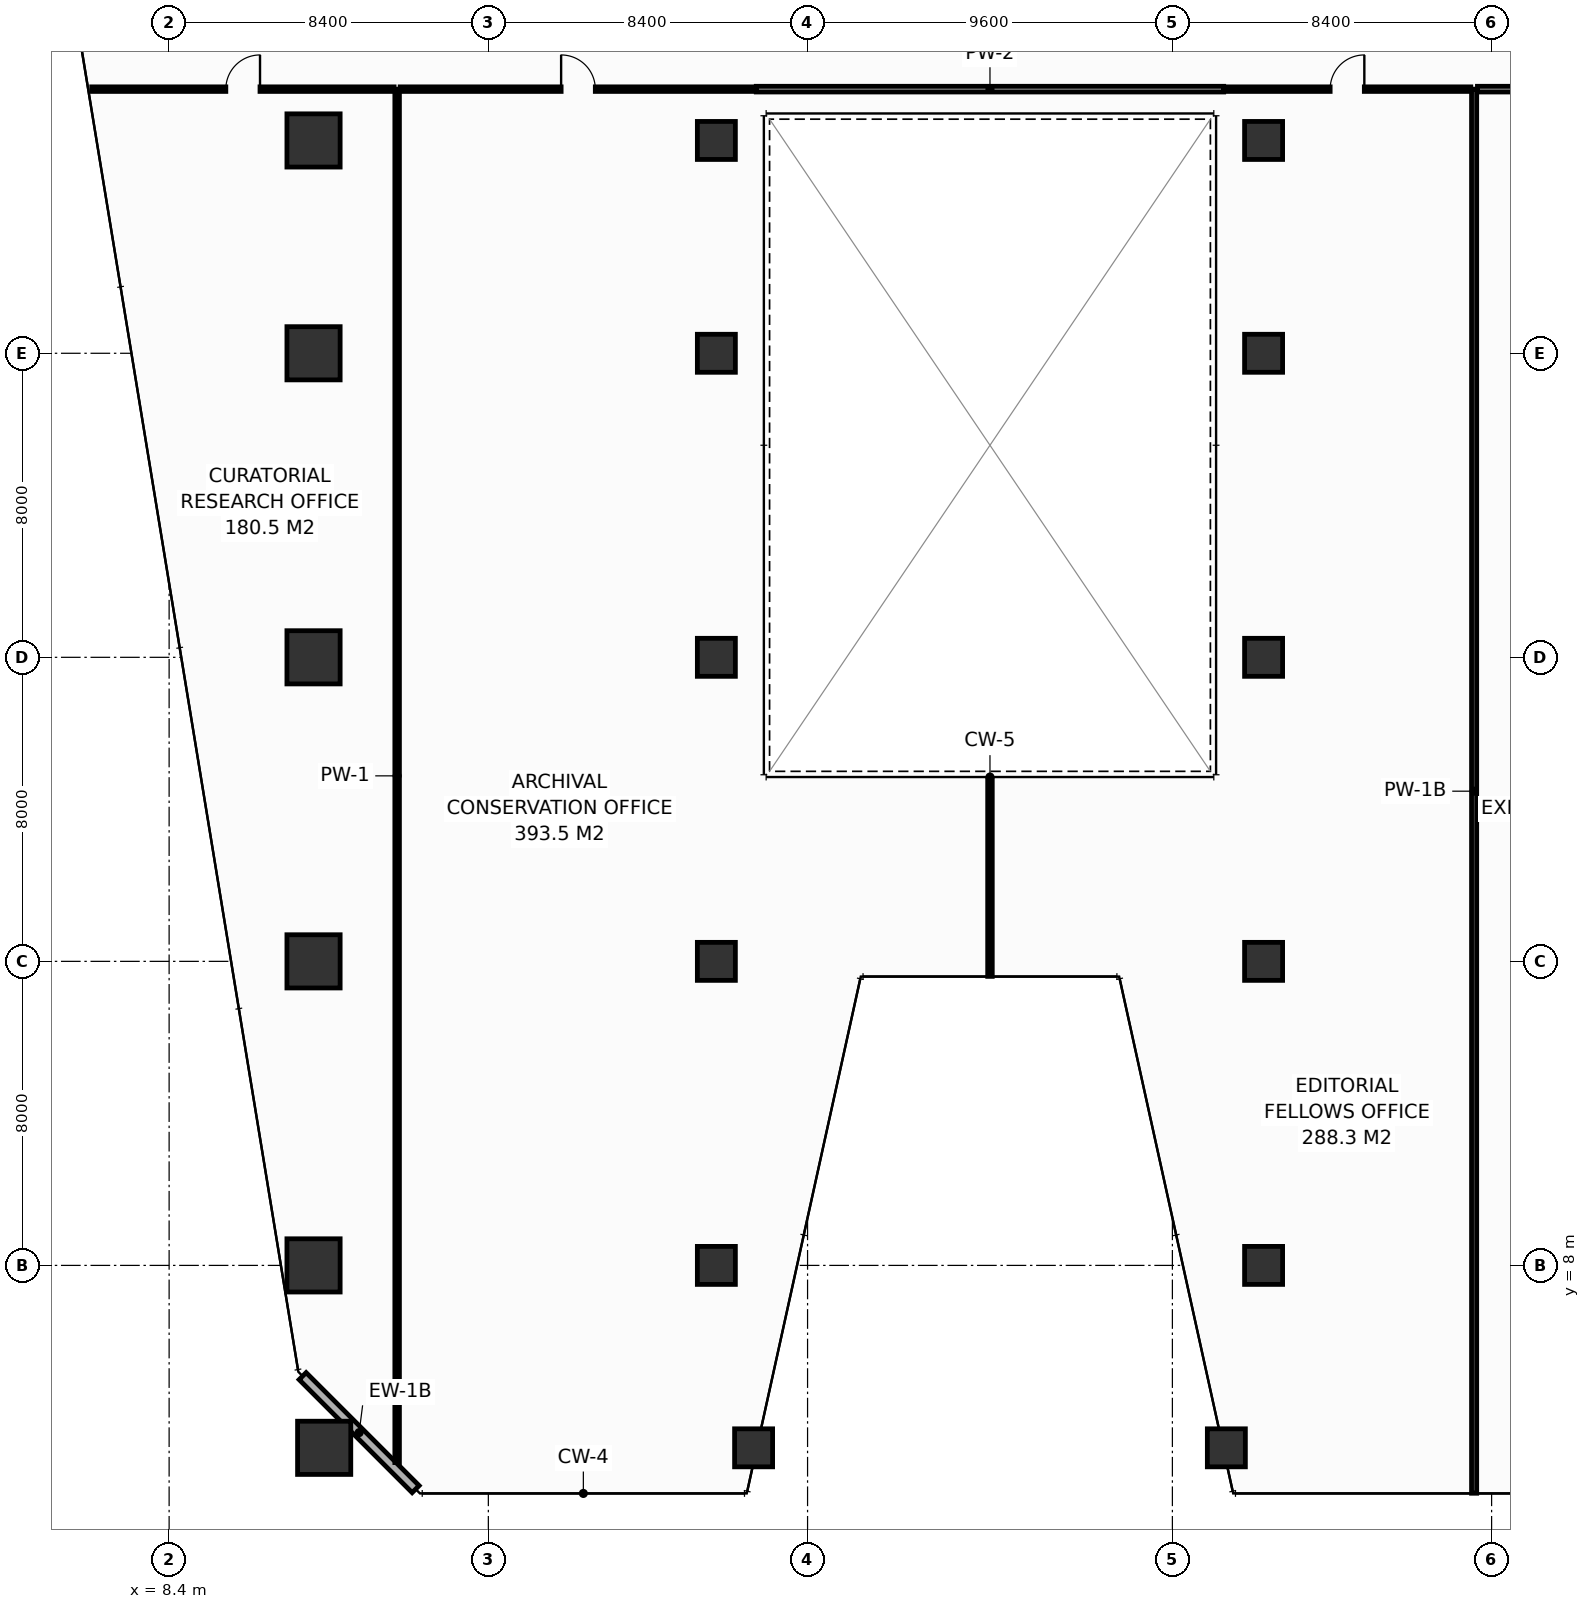
"""IFC4 building model, lengths in metres.
Left out: names, types, materials, properties, quantities, classifications, styles, units other than length and angle.
Written with IfcOpenShell. Run it as: python <this file> out.ifc"""

import sys

from ifc_helpers import new_model, si_unit, direction, frame, frame_2d, origin, origin_2d, place, context, subcontext, project, spatial, rectangle, hollow_rectangle, extrude, element, fill, save


model = new_model("IFC4")
c1 = context("Model", 3, precision=1e-05, world=origin(), true_north=direction((0.0, 1.0)))
c2 = subcontext(c1, "Body", "Model", "MODEL_VIEW")
j1 = project(units=[si_unit("LENGTHUNIT", "METRE"), si_unit("PLANEANGLEUNIT", "RADIAN")], contexts=[c1])
p1 = place(None, origin())
s1 = spatial("IfcSite", under=j1, at=p1, CompositionType="ELEMENT")
p2 = place(p1, origin())
s2 = spatial("IfcBuilding", under=s1, at=p2, CompositionType="ELEMENT")
p3 = place(p2, frame((0.0, 0.0, 33.0)))
s3 = spatial("IfcBuildingStorey", under=s2, at=p3, CompositionType="ELEMENT", Elevation=33.0)
p4 = place(p3, frame((12.48, 3.2, 0.0), z_axis=(0.0, 0.0, 1.0), x_axis=(1.0, 0.0, 0.0)))
e1 = element("IfcColumn", 1, at=p4, inside=s3, PredefinedType="COLUMN", context=c2, shape_type="SweptSolid", body=[
    extrude(hollow_rectangle(XDim=1.4, YDim=1.4, WallThickness=0.065, at=origin_2d()), origin(), (0.0, 0.0, 1.0), 5.4),
])
for number, where, z_axis, x_axis in (
    (2, (23.78, 3.2, 0.0), (0.0, 0.0, 1.0), (1.0, 0.0, 0.0)),
    (3, (36.22, 3.2, 0.0), (0.0, 0.0, 1.0), (1.0, 0.0, 0.0)),
):
    element("IfcColumn", number, at=place(p3, frame(where, z_axis=z_axis, x_axis=x_axis)), inside=s3, PredefinedType="COLUMN", context=c2, shape_type="SweptSolid", body=[
        extrude(hollow_rectangle(XDim=1.0, YDim=1.0, WallThickness=0.045, at=origin_2d()), origin(), (0.0, 0.0, 1.0), 5.4),
    ])
p5 = place(p3, frame((12.2, 8.0, 0.0), z_axis=(0.0, 0.0, 1.0), x_axis=(1.0, 0.0, 0.0)))
e4 = element("IfcColumn", 4, at=p5, inside=s3, PredefinedType="COLUMN", context=c2, shape_type="SweptSolid", body=[
    extrude(hollow_rectangle(XDim=1.4, YDim=1.4, WallThickness=0.065, at=origin_2d()), origin(), (0.0, 0.0, 1.0), 5.4),
])
for number, where, z_axis, x_axis in (
    (5, (22.8, 8.0, 0.0), (0.0, 0.0, 1.0), (1.0, 0.0, 0.0)),
    (6, (37.2, 8.0, 0.0), (0.0, 0.0, 1.0), (1.0, 0.0, 0.0)),
):
    element("IfcColumn", number, at=place(p3, frame(where, z_axis=z_axis, x_axis=x_axis)), inside=s3, PredefinedType="COLUMN", context=c2, shape_type="SweptSolid", body=[
        extrude(hollow_rectangle(XDim=1.0, YDim=1.0, WallThickness=0.045, at=origin_2d()), origin(), (0.0, 0.0, 1.0), 5.4),
    ])
p6 = place(p3, frame((12.2, 16.0, 0.0), z_axis=(0.0, 0.0, 1.0), x_axis=(1.0, 0.0, 0.0)))
e7 = element("IfcColumn", 7, at=p6, inside=s3, PredefinedType="COLUMN", context=c2, shape_type="SweptSolid", body=[
    extrude(hollow_rectangle(XDim=1.4, YDim=1.4, WallThickness=0.065, at=origin_2d()), origin(), (0.0, 0.0, 1.0), 5.4),
])
for number, where, z_axis, x_axis in (
    (8, (22.8, 16.0, 0.0), (0.0, 0.0, 1.0), (1.0, 0.0, 0.0)),
    (9, (37.2, 16.0, 0.0), (0.0, 0.0, 1.0), (1.0, 0.0, 0.0)),
):
    element("IfcColumn", number, at=place(p3, frame(where, z_axis=z_axis, x_axis=x_axis)), inside=s3, PredefinedType="COLUMN", context=c2, shape_type="SweptSolid", body=[
        extrude(hollow_rectangle(XDim=1.0, YDim=1.0, WallThickness=0.045, at=origin_2d()), origin(), (0.0, 0.0, 1.0), 5.4),
    ])
p7 = place(p3, frame((12.2, 24.0, 0.0), z_axis=(0.0, 0.0, 1.0), x_axis=(1.0, 0.0, 0.0)))
e10 = element("IfcColumn", 10, at=p7, inside=s3, PredefinedType="COLUMN", context=c2, shape_type="SweptSolid", body=[
    extrude(hollow_rectangle(XDim=1.4, YDim=1.4, WallThickness=0.065, at=origin_2d()), origin(), (0.0, 0.0, 1.0), 5.4),
])
for number, where, z_axis, x_axis in (
    (11, (22.8, 24.0, 0.0), (0.0, 0.0, 1.0), (1.0, 0.0, 0.0)),
    (12, (37.2, 24.0, 0.0), (0.0, 0.0, 1.0), (1.0, 0.0, 0.0)),
):
    element("IfcColumn", number, at=place(p3, frame(where, z_axis=z_axis, x_axis=x_axis)), inside=s3, PredefinedType="COLUMN", context=c2, shape_type="SweptSolid", body=[
        extrude(hollow_rectangle(XDim=1.0, YDim=1.0, WallThickness=0.045, at=origin_2d()), origin(), (0.0, 0.0, 1.0), 5.4),
    ])
p8 = place(p3, frame((12.2, 32.0, 0.0), z_axis=(0.0, 0.0, 1.0), x_axis=(1.0, 0.0, 0.0)))
e13 = element("IfcColumn", 13, at=p8, inside=s3, PredefinedType="COLUMN", context=c2, shape_type="SweptSolid", body=[
    extrude(hollow_rectangle(XDim=1.4, YDim=1.4, WallThickness=0.065, at=origin_2d()), origin(), (0.0, 0.0, 1.0), 5.4),
])
for number, where, z_axis, x_axis in (
    (14, (22.8, 32.0, 0.0), (0.0, 0.0, 1.0), (1.0, 0.0, 0.0)),
    (15, (37.2, 32.0, 0.0), (0.0, 0.0, 1.0), (1.0, 0.0, 0.0)),
):
    element("IfcColumn", number, at=place(p3, frame(where, z_axis=z_axis, x_axis=x_axis)), inside=s3, PredefinedType="COLUMN", context=c2, shape_type="SweptSolid", body=[
        extrude(hollow_rectangle(XDim=1.0, YDim=1.0, WallThickness=0.045, at=origin_2d()), origin(), (0.0, 0.0, 1.0), 5.4),
    ])
p9 = place(p3, frame((12.2, 37.6, 0.0), z_axis=(0.0, 0.0, 1.0), x_axis=(1.0, 0.0, 0.0)))
e16 = element("IfcColumn", 16, at=p9, inside=s3, PredefinedType="COLUMN", context=c2, shape_type="SweptSolid", body=[
    extrude(hollow_rectangle(XDim=1.4, YDim=1.4, WallThickness=0.065, at=origin_2d()), origin(), (0.0, 0.0, 1.0), 5.4),
])
for number, where, z_axis, x_axis in (
    (17, (22.8, 37.6, 0.0), (0.0, 0.0, 1.0), (1.0, 0.0, 0.0)),
    (18, (37.2, 37.6, 0.0), (0.0, 0.0, 1.0), (1.0, 0.0, 0.0)),
):
    element("IfcColumn", number, at=place(p3, frame(where, z_axis=z_axis, x_axis=x_axis)), inside=s3, PredefinedType="COLUMN", context=c2, shape_type="SweptSolid", body=[
        extrude(hollow_rectangle(XDim=1.0, YDim=1.0, WallThickness=0.045, at=origin_2d()), origin(), (0.0, 0.0, 1.0), 5.4),
    ])
p10 = place(p3, frame((11.913, 5.087, 0.0), z_axis=(0.0, 0.0, 1.0), x_axis=(0.707106781187, -0.707106781187, 0.0)))
e19 = element("IfcWall", 19, at=p10, inside=s3, PredefinedType="STANDARD", context=c2, shape_type="SweptSolid", body=[
    extrude(rectangle(XDim=4.206, YDim=0.26, at=frame_2d((2.103, 0.0))), origin(), (0.0, 0.0, 1.0), 4.95),
])
p11 = place(p3, frame((14.4, 2.812, 0.0), z_axis=(0.0, 0.0, 1.0), x_axis=(0.0, 1.0, 0.0)))
e20 = element("IfcWall", 20, at=p11, inside=s3, PredefinedType="PARTITIONING", context=c2, shape_type="SweptSolid", body=[
    extrude(rectangle(XDim=36.138, YDim=0.12, at=frame_2d((18.069, 0.0))), origin(), (0.0, 0.0, 1.0), 3.135),
])
p12 = place(p3, frame((42.74, 2.005, 0.0), z_axis=(0.0, 0.0, 1.0), x_axis=(0.0, 1.0, 0.0)))
e21 = element("IfcWall", 21, at=p12, inside=s3, PredefinedType="PARTITIONING", context=c2, shape_type="SweptSolid", body=[
    extrude(rectangle(XDim=36.945, YDim=0.135, at=frame_2d((18.473, 0.0))), origin(), (0.0, 0.0, 1.0), 3.135),
])
p13 = place(p3, frame((30.0, 15.605, 0.0), z_axis=(0.0, 0.0, 1.0), x_axis=(0.0, 1.0, 0.0)))
e22 = element("IfcWall", 22, at=p13, inside=s3, PredefinedType="PARTITIONING", context=c2, shape_type="SweptSolid", body=[
    extrude(rectangle(XDim=5.175, YDim=0.12, at=frame_2d((2.587, 0.0))), origin(), (0.0, 0.0, 1.0), 2.735),
])
p14 = place(p3, frame((6.363, 38.95, 0.0), z_axis=(0.0, 0.0, 1.0), x_axis=(1.0, 0.0, 0.0)))
e23 = element("IfcWall", 23, at=p14, inside=s3, PredefinedType="PARTITIONING", context=c2, shape_type="SweptSolid", body=[
    extrude(rectangle(XDim=7.957, YDim=0.12, at=frame_2d((3.979, 0.0))), origin(), (0.0, 0.0, 1.0), 3.135),
])
p15 = place(p14, frame((3.529, 0.0, 0.0)))
e24 = element("IfcOpeningElement", 24, at=p15, cuts=e23, PredefinedType="OPENING", context=c2, shape_type="SweptSolid", body=[
    extrude(rectangle(XDim=0.9, YDim=2.1, at=frame_2d((0.45, 1.05))), frame((0.0, 0.07, 0.0), z_axis=(0.0, -1.0, 0.0), x_axis=(1.0, 0.0, 0.0)), (0.0, 0.0, 1.0), 0.14),
])
p16 = place(p3, frame((14.48, 38.95, 0.0), z_axis=(0.0, 0.0, 1.0), x_axis=(1.0, 0.0, 0.0)))
e25 = element("IfcWall", 25, at=p16, inside=s3, PredefinedType="PARTITIONING", context=c2, shape_type="SweptSolid", body=[
    extrude(rectangle(XDim=9.37, YDim=0.12, at=frame_2d((4.685, 0.0))), origin(), (0.0, 0.0, 1.0), 3.535),
])
p17 = place(p16, frame((4.235, 0.0, 0.0)))
e26 = element("IfcOpeningElement", 26, at=p17, cuts=e25, PredefinedType="OPENING", context=c2, shape_type="SweptSolid", body=[
    extrude(rectangle(XDim=0.9, YDim=2.1, at=frame_2d((0.45, 1.05))), frame((0.0, 0.07, 0.0), z_axis=(0.0, -1.0, 0.0), x_axis=(1.0, 0.0, 0.0)), (0.0, 0.0, 1.0), 0.14),
])
p18 = place(p3, frame((23.85, 38.95, 0.0), z_axis=(0.0, 0.0, 1.0), x_axis=(1.0, 0.0, 0.0)))
e27 = element("IfcWall", 27, at=p18, inside=s3, PredefinedType="PARTITIONING", context=c2, shape_type="SweptSolid", body=[
    extrude(rectangle(XDim=12.3, YDim=0.15, at=frame_2d((6.15, 0.0))), origin(), (0.0, 0.0, 1.0), 4.95),
])
p19 = place(p3, frame((36.15, 38.95, 0.0), z_axis=(0.0, 0.0, 1.0), x_axis=(1.0, 0.0, 0.0)))
e28 = element("IfcWall", 28, at=p19, inside=s3, PredefinedType="PARTITIONING", context=c2, shape_type="SweptSolid", body=[
    extrude(rectangle(XDim=6.503, YDim=0.12, at=frame_2d((3.251, 0.0))), origin(), (0.0, 0.0, 1.0), 3.535),
])
p20 = place(p19, frame((2.801, 0.0, 0.0)))
e29 = element("IfcOpeningElement", 29, at=p20, cuts=e28, PredefinedType="OPENING", context=c2, shape_type="SweptSolid", body=[
    extrude(rectangle(XDim=0.9, YDim=2.1, at=frame_2d((0.45, 1.05))), frame((0.0, 0.07, 0.0), z_axis=(0.0, -1.0, 0.0), x_axis=(1.0, 0.0, 0.0)), (0.0, 0.0, 1.0), 0.14),
])
p21 = place(p3, frame((42.827, 38.95, 0.0), z_axis=(0.0, 0.0, 1.0), x_axis=(1.0, 0.0, 0.0)))
e30 = element("IfcWall", 30, at=p21, inside=s3, PredefinedType="PARTITIONING", context=c2, shape_type="SweptSolid", body=[
    extrude(rectangle(XDim=5.555, YDim=0.15, at=frame_2d((2.778, 0.0))), origin(), (0.0, 0.0, 1.0), 4.95),
])
p22 = place(p21, frame((2.252, 0.0, 0.0)))
e31 = element("IfcOpeningElement", 31, at=p22, cuts=e30, PredefinedType="OPENING", context=c2, shape_type="SweptSolid", body=[
    extrude(rectangle(XDim=1.05, YDim=2.15, at=frame_2d((0.525, 1.075))), frame((0.0, 0.085, 0.0), z_axis=(0.0, -1.0, 0.0), x_axis=(1.0, 0.0, 0.0)), (0.0, 0.0, 1.0), 0.17),
])
p23 = place(p15, origin())
e32 = element("IfcDoor", 32, at=p23, inside=s3, OperationType="SINGLE_SWING_RIGHT", PredefinedType="DOOR", context=c2, shape_type="SweptSolid", body=[
    extrude(rectangle(XDim=0.9, YDim=2.1, at=frame_2d((0.45, 1.05))), frame((0.0, 0.025, 0.0), z_axis=(0.0, -1.0, 0.0), x_axis=(1.0, 0.0, 0.0)), (0.0, 0.0, 1.0), 0.05),
])
fill(e24, e32)
p24 = place(p17, origin())
e33 = element("IfcDoor", 33, at=p24, inside=s3, OperationType="SINGLE_SWING_LEFT", PredefinedType="DOOR", context=c2, shape_type="SweptSolid", body=[
    extrude(rectangle(XDim=0.9, YDim=2.1, at=frame_2d((0.45, 1.05))), frame((0.0, 0.025, 0.0), z_axis=(0.0, -1.0, 0.0), x_axis=(1.0, 0.0, 0.0)), (0.0, 0.0, 1.0), 0.05),
])
fill(e26, e33)
p25 = place(p20, origin())
e34 = element("IfcDoor", 34, at=p25, inside=s3, OperationType="SINGLE_SWING_RIGHT", PredefinedType="DOOR", context=c2, shape_type="SweptSolid", body=[
    extrude(rectangle(XDim=0.9, YDim=2.1, at=frame_2d((0.45, 1.05))), frame((0.0, 0.025, 0.0), z_axis=(0.0, -1.0, 0.0), x_axis=(1.0, 0.0, 0.0)), (0.0, 0.0, 1.0), 0.05),
])
fill(e29, e34)
save(model, sys.argv[1])
